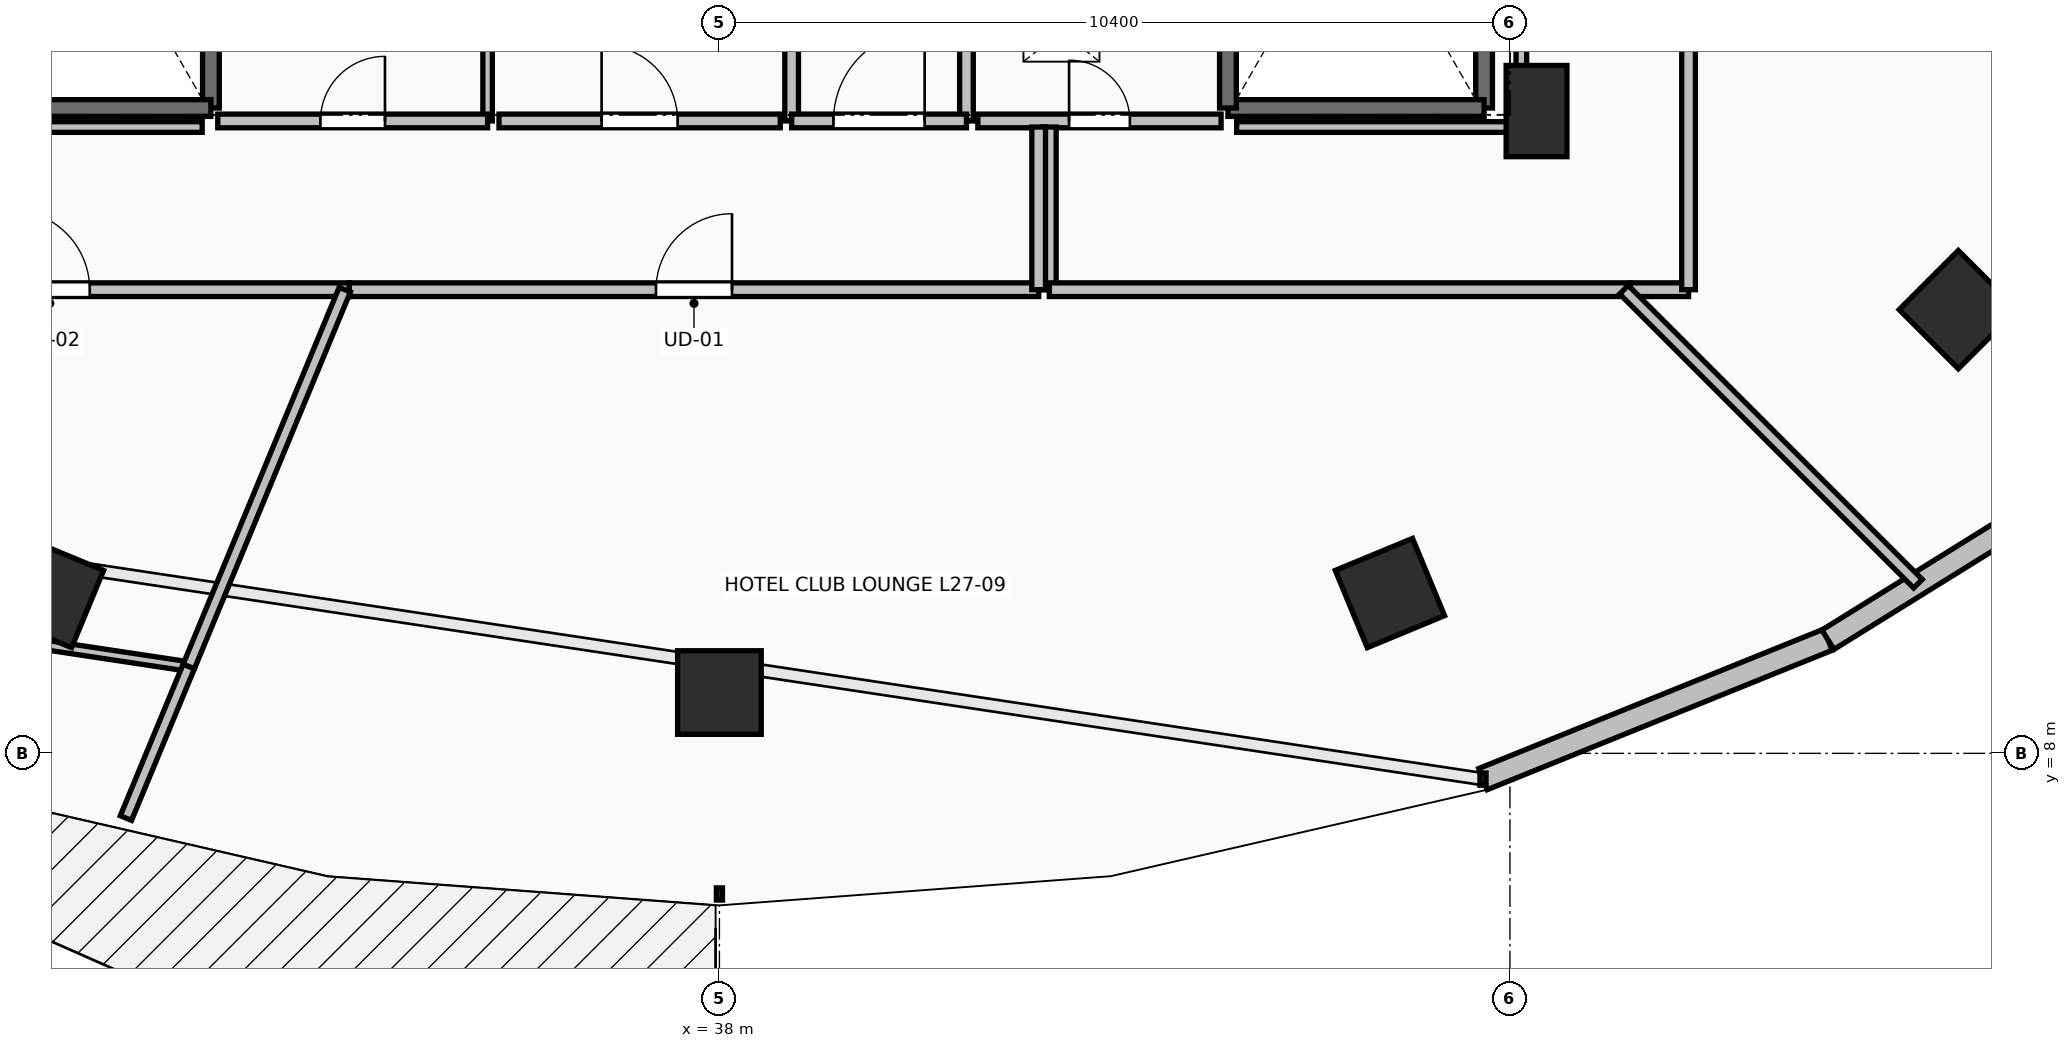
"""IFC4 building model, lengths in metres.
Left out: names, types, materials, properties, quantities, classifications, styles, units other than length and angle.
Written with IfcOpenShell. Run it as: python <this file> out.ifc"""

import sys

from ifc_helpers import new_model, si_unit, direction, frame, frame_2d, origin, origin_2d, place, context, subcontext, project, spatial, rectangle, extrude, element, fill, save


model = new_model("IFC4")
c1 = context("Model", 3, precision=1e-05, world=origin(), true_north=direction((0.0, 1.0)))
c2 = subcontext(c1, "Body", "Model", "MODEL_VIEW")
j1 = project(units=[si_unit("LENGTHUNIT", "METRE"), si_unit("PLANEANGLEUNIT", "RADIAN")], contexts=[c1])
p1 = place(None, origin())
s1 = spatial("IfcSite", under=j1, at=p1, CompositionType="ELEMENT")
p2 = place(p1, origin())
s2 = spatial("IfcBuilding", under=s1, at=p2, CompositionType="ELEMENT")
p3 = place(p2, frame((0.0, 0.0, 103.3)))
s3 = spatial("IfcBuildingStorey", under=s2, at=p3, CompositionType="ELEMENT", Elevation=103.3)
for number, where, z_axis, x_axis in (
    (1, (29.179, 10.109, 0.0), (0.0, 0.0, 1.0), (-0.383, -0.924, 0.0)),
    (2, (38.0, 8.8, 0.0), (0.0, 0.0, 1.0), (0.0, -1.0, 0.0)),
    (3, (46.821, 10.109, 0.0), (0.0, 0.0, 1.0), (0.383, -0.924, 0.0)),
    (4, (54.299, 13.838, 0.0), (0.0, 0.0, 1.0), (0.707, -0.707, 0.0)),
):
    element("IfcColumn", number, at=place(p3, frame(where, z_axis=z_axis, x_axis=x_axis)), inside=s3, PredefinedType="COLUMN", context=c2, shape_type="SweptSolid", body=[
        extrude(rectangle(XDim=1.1, YDim=1.1, at=origin_2d()), origin(), (0.0, 0.0, 1.0), 3.5),
    ])
p4 = place(p3, frame((48.75, 16.45, 0.0), z_axis=(0.0, 0.0, 1.0), x_axis=(1.0, 0.0, 0.0)))
e5 = element("IfcColumn", 5, at=p4, inside=s3, PredefinedType="PILASTER", context=c2, shape_type="SweptSolid", body=[
    extrude(rectangle(XDim=0.8, YDim=1.2, at=origin_2d()), origin(), (0.0, 0.0, 1.0), 3.5),
])
p5 = place(p3, frame((48.045, 7.661, 0.0), z_axis=(0.0, 0.0, 1.0), x_axis=(0.927122233109, 0.374759075775, 0.0)))
e6 = element("IfcWall", 6, at=p5, inside=s3, PredefinedType="STANDARD", context=c2, shape_type="SweptSolid", body=[
    extrude(rectangle(XDim=4.895, YDim=0.3, at=frame_2d((2.448, 0.0))), origin(), (0.0, 0.0, 1.0), 3.24),
])
p6 = place(p3, frame((52.584, 9.495, 0.0), z_axis=(0.0, 0.0, 1.0), x_axis=(0.849684479743, 0.527291461038, 0.0)))
e7 = element("IfcWall", 7, at=p6, inside=s3, PredefinedType="STANDARD", context=c2, shape_type="SweptSolid", body=[
    extrude(rectangle(XDim=4.681, YDim=0.3, at=frame_2d((2.341, 0.0))), origin(), (0.0, 0.0, 1.0), 3.24),
])
p7 = place(p3, frame((31.31, 23.91, 0.0), z_axis=(0.0, 0.0, 1.0), x_axis=(0.0, -1.0, 0.0)))
e8 = element("IfcWall", 8, at=p7, inside=s3, PredefinedType="SOLIDWALL", context=c2, shape_type="SweptSolid", body=[
    extrude(rectangle(XDim=7.42, YDim=0.22, at=frame_2d((3.71, 0.0))), origin(), (0.0, 0.0, 1.0), 3.24),
])
p8 = place(p3, frame((31.31, 16.49, 0.0), z_axis=(0.0, 0.0, 1.0), x_axis=(-1.0, 0.0, 0.0)))
e9 = element("IfcWall", 9, at=p8, inside=s3, PredefinedType="SOLIDWALL", context=c2, shape_type="SweptSolid", body=[
    extrude(rectangle(XDim=3.37, YDim=0.22, at=frame_2d((1.685, 0.0))), origin(), (0.0, 0.0, 1.0), 3.24),
])
p9 = place(p3, frame((48.06, 23.91, 0.0), z_axis=(0.0, 0.0, 1.0), x_axis=(0.0, -1.0, 0.0)))
e10 = element("IfcWall", 10, at=p9, inside=s3, PredefinedType="SOLIDWALL", context=c2, shape_type="SweptSolid", body=[
    extrude(rectangle(XDim=7.42, YDim=0.22, at=frame_2d((3.71, 0.0))), origin(), (0.0, 0.0, 1.0), 3.24),
])
p10 = place(p3, frame((48.06, 16.49, 0.0), z_axis=(0.0, 0.0, 1.0), x_axis=(-1.0, 0.0, 0.0)))
e11 = element("IfcWall", 11, at=p10, inside=s3, PredefinedType="SOLIDWALL", context=c2, shape_type="SweptSolid", body=[
    extrude(rectangle(XDim=3.37, YDim=0.22, at=frame_2d((1.685, 0.0))), origin(), (0.0, 0.0, 1.0), 3.24),
])
p11 = place(p3, frame((44.69, 16.49, 0.0), z_axis=(0.0, 0.0, 1.0), x_axis=(0.0, 1.0, 0.0)))
e12 = element("IfcWall", 12, at=p11, inside=s3, PredefinedType="SOLIDWALL", context=c2, shape_type="SweptSolid", body=[
    extrude(rectangle(XDim=7.42, YDim=0.22, at=frame_2d((3.71, 0.0))), origin(), (0.0, 0.0, 1.0), 3.24),
])
p12 = place(p3, frame((41.25, 16.32, 0.0), z_axis=(0.0, 0.0, 1.0), x_axis=(0.0, 1.0, 0.0)))
e13 = element("IfcWall", 13, at=p12, inside=s3, PredefinedType="PARTITIONING", context=c2, shape_type="SweptSolid", body=[
    extrude(rectangle(XDim=3.985, YDim=0.18, at=frame_2d((1.992, 0.0))), origin(), (0.0, 0.0, 1.0), 3.24),
])
p13 = place(p12, frame((1.593, 0.0, 0.0)))
e14 = element("IfcOpeningElement", 14, at=p13, cuts=e13, PredefinedType="OPENING", context=c2, shape_type="SweptSolid", body=[
    extrude(rectangle(XDim=0.8, YDim=2.05, at=frame_2d((0.4, 1.025))), frame((0.0, 0.105, 0.0), z_axis=(0.0, -1.0, 0.0), x_axis=(1.0, 0.0, 0.0)), (0.0, 0.0, 1.0), 0.21),
])
p14 = place(p3, frame((38.95, 21.755, 0.0), z_axis=(0.0, 0.0, 1.0), x_axis=(0.0, -1.0, 0.0)))
e15 = element("IfcWall", 15, at=p14, inside=s3, PredefinedType="PARTITIONING", context=c2, shape_type="SweptSolid", body=[
    extrude(rectangle(XDim=5.435, YDim=0.18, at=frame_2d((2.717, 0.0))), origin(), (0.0, 0.0, 1.0), 3.24),
])
p15 = place(p14, frame((2.218, 0.0, 0.0)))
e16 = element("IfcOpeningElement", 16, at=p15, cuts=e15, PredefinedType="OPENING", context=c2, shape_type="SweptSolid", body=[
    extrude(rectangle(XDim=1.0, YDim=2.15, at=frame_2d((0.5, 1.075))), frame((0.0, 0.105, 0.0), z_axis=(0.0, -1.0, 0.0), x_axis=(1.0, 0.0, 0.0)), (0.0, 0.0, 1.0), 0.21),
])
p16 = place(p3, frame((38.95, 16.32, 0.0), z_axis=(0.0, 0.0, 1.0), x_axis=(1.0, 0.0, 0.0)))
e17 = element("IfcWall", 17, at=p16, inside=s3, PredefinedType="PARTITIONING", context=c2, shape_type="SweptSolid", body=[
    extrude(rectangle(XDim=2.3, YDim=0.18, at=frame_2d((1.15, 0.0))), origin(), (0.0, 0.0, 1.0), 3.24),
])
p17 = place(p16, frame((0.55, 0.0, 0.0)))
e18 = element("IfcOpeningElement", 18, at=p17, cuts=e17, PredefinedType="OPENING", context=c2, shape_type="SweptSolid", body=[
    extrude(rectangle(XDim=1.2, YDim=2.15, at=frame_2d((0.6, 1.075))), frame((0.0, 0.105, 0.0), z_axis=(0.0, -1.0, 0.0), x_axis=(1.0, 0.0, 0.0)), (0.0, 0.0, 1.0), 0.21),
])
p18 = place(p3, frame((41.4, 16.32, 0.0), z_axis=(0.0, 0.0, 1.0), x_axis=(1.0, 0.0, 0.0)))
e19 = element("IfcWall", 19, at=p18, inside=s3, PredefinedType="PARTITIONING", context=c2, shape_type="SweptSolid", body=[
    extrude(rectangle(XDim=3.2, YDim=0.18, at=frame_2d((1.6, 0.0))), origin(), (0.0, 0.0, 1.0), 3.24),
])
p19 = place(p18, frame((1.2, 0.0, 0.0)))
e20 = element("IfcOpeningElement", 20, at=p19, cuts=e19, PredefinedType="OPENING", context=c2, shape_type="SweptSolid", body=[
    extrude(rectangle(XDim=0.8, YDim=2.05, at=frame_2d((0.4, 1.025))), frame((0.0, 0.105, 0.0), z_axis=(0.0, -1.0, 0.0), x_axis=(1.0, 0.0, 0.0)), (0.0, 0.0, 1.0), 0.21),
])
p20 = place(p3, frame((34.95, 16.32, 0.0), z_axis=(0.0, 0.0, 1.0), x_axis=(0.0, 1.0, 0.0)))
e21 = element("IfcWall", 21, at=p20, inside=s3, PredefinedType="PARTITIONING", context=c2, shape_type="SweptSolid", body=[
    extrude(rectangle(XDim=5.13, YDim=0.125, at=frame_2d((2.565, 0.0))), origin(), (0.0, 0.0, 1.0), 3.24),
])
p21 = place(p3, frame((31.4, 16.32, 0.0), z_axis=(0.0, 0.0, 1.0), x_axis=(1.0, 0.0, 0.0)))
e22 = element("IfcWall", 22, at=p21, inside=s3, PredefinedType="PARTITIONING", context=c2, shape_type="SweptSolid", body=[
    extrude(rectangle(XDim=3.55, YDim=0.18, at=frame_2d((1.775, 0.0))), origin(), (0.0, 0.0, 1.0), 3.24),
])
p22 = place(p21, frame((1.35, 0.0, 0.0)))
e23 = element("IfcOpeningElement", 23, at=p22, cuts=e22, PredefinedType="OPENING", context=c2, shape_type="SweptSolid", body=[
    extrude(rectangle(XDim=0.85, YDim=2.1, at=frame_2d((0.425, 1.05))), frame((0.0, 0.105, 0.0), z_axis=(0.0, -1.0, 0.0), x_axis=(1.0, 0.0, 0.0)), (0.0, 0.0, 1.0), 0.21),
])
p23 = place(p3, frame((35.1, 16.32, 0.0), z_axis=(0.0, 0.0, 1.0), x_axis=(1.0, 0.0, 0.0)))
e24 = element("IfcWall", 24, at=p23, inside=s3, PredefinedType="PARTITIONING", context=c2, shape_type="SweptSolid", body=[
    extrude(rectangle(XDim=3.7, YDim=0.18, at=frame_2d((1.85, 0.0))), origin(), (0.0, 0.0, 1.0), 3.24),
])
p24 = place(p23, frame((1.35, 0.0, 0.0)))
e25 = element("IfcOpeningElement", 25, at=p24, cuts=e24, PredefinedType="OPENING", context=c2, shape_type="SweptSolid", body=[
    extrude(rectangle(XDim=1.0, YDim=2.15, at=frame_2d((0.5, 1.075))), frame((0.0, 0.105, 0.0), z_axis=(0.0, -1.0, 0.0), x_axis=(1.0, 0.0, 0.0)), (0.0, 0.0, 1.0), 0.21),
])
p25 = place(p3, frame((25.25, 14.1, 0.0), z_axis=(0.0, 0.0, 1.0), x_axis=(1.0, 0.0, 0.0)))
e26 = element("IfcWall", 26, at=p25, inside=s3, PredefinedType="PARTITIONING", context=c2, shape_type="SweptSolid", body=[
    extrude(rectangle(XDim=7.881, YDim=0.18, at=frame_2d((3.94, 0.0))), origin(), (0.0, 0.0, 1.0), 2.432),
])
p26 = place(p25, frame((3.416, 0.0, 0.0)))
e27 = element("IfcOpeningElement", 27, at=p26, cuts=e26, PredefinedType="OPENING", context=c2, shape_type="SweptSolid", body=[
    extrude(rectangle(XDim=1.05, YDim=2.2, at=frame_2d((0.525, 1.1))), frame((0.0, 0.105, 0.0), z_axis=(0.0, -1.0, 0.0), x_axis=(1.0, 0.0, 0.0)), (0.0, 0.0, 1.0), 0.21),
])
p27 = place(p3, frame((42.34, 16.24, 0.0), z_axis=(0.0, 0.0, 1.0), x_axis=(0.0, -1.0, 0.0)))
e28 = element("IfcWall", 28, at=p27, inside=s3, PredefinedType="PARTITIONING", context=c2, shape_type="SweptSolid", body=[
    extrude(rectangle(XDim=2.14, YDim=0.18, at=frame_2d((1.07, 0.0))), origin(), (0.0, 0.0, 1.0), 3.24),
])
p28 = place(p3, frame((42.34, 14.1, 0.0), z_axis=(0.0, 0.0, 1.0), x_axis=(1.0, 0.0, 0.0)))
e29 = element("IfcWall", 29, at=p28, inside=s3, PredefinedType="PARTITIONING", context=c2, shape_type="SweptSolid", body=[
    extrude(rectangle(XDim=7.645, YDim=0.18, at=frame_2d((3.823, 0.0))), origin(), (0.0, 0.0, 1.0), 2.432),
])
p29 = place(p3, frame((33.131, 14.1, 0.0), z_axis=(0.0, 0.0, 1.0), x_axis=(1.0, 0.0, 0.0)))
e30 = element("IfcWall", 30, at=p29, inside=s3, PredefinedType="PARTITIONING", context=c2, shape_type="SweptSolid", body=[
    extrude(rectangle(XDim=9.069, YDim=0.18, at=frame_2d((4.534, 0.0))), origin(), (0.0, 0.0, 1.0), 2.886),
])
p30 = place(p29, frame((4.034, 0.0, 0.0)))
e31 = element("IfcOpeningElement", 31, at=p30, cuts=e30, PredefinedType="OPENING", context=c2, shape_type="SweptSolid", body=[
    extrude(rectangle(XDim=1.0, YDim=2.15, at=frame_2d((0.5, 1.075))), frame((0.0, 0.105, 0.0), z_axis=(0.0, -1.0, 0.0), x_axis=(1.0, 0.0, 0.0)), (0.0, 0.0, 1.0), 0.21),
])
p31 = place(p3, frame((42.2, 14.1, 0.0), z_axis=(0.0, 0.0, 1.0), x_axis=(0.0, 1.0, 0.0)))
e32 = element("IfcWall", 32, at=p31, inside=s3, PredefinedType="PARTITIONING", context=c2, shape_type="SweptSolid", body=[
    extrude(rectangle(XDim=2.14, YDim=0.18, at=frame_2d((1.07, 0.0))), origin(), (0.0, 0.0, 1.0), 3.24),
])
p32 = place(p3, frame((49.985, 14.1, 0.0), z_axis=(0.0, 0.0, 1.0), x_axis=(1.0, 0.0, 0.0)))
e33 = element("IfcWall", 33, at=p32, inside=s3, PredefinedType="PARTITIONING", context=c2, shape_type="SweptSolid", body=[
    extrude(rectangle(XDim=0.765, YDim=0.18, at=frame_2d((0.382, 0.0))), origin(), (0.0, 0.0, 1.0), 2.972),
])
p33 = place(p3, frame((50.75, 14.1, 0.0), z_axis=(0.0, 0.0, 1.0), x_axis=(0.0, 1.0, 0.0)))
e34 = element("IfcWall", 34, at=p33, inside=s3, PredefinedType="PARTITIONING", context=c2, shape_type="SweptSolid", body=[
    extrude(rectangle(XDim=16.981, YDim=0.18, at=frame_2d((8.49, 0.0))), origin(), (0.0, 0.0, 1.0), 2.432),
])
p34 = place(p33, frame((7.99, 0.0, 0.0)))
e35 = element("IfcOpeningElement", 35, at=p34, cuts=e34, PredefinedType="OPENING", context=c2, shape_type="SweptSolid", body=[
    extrude(rectangle(XDim=1.0, YDim=2.15, at=frame_2d((0.5, 1.075))), frame((0.0, 0.105, 0.0), z_axis=(0.0, -1.0, 0.0), x_axis=(1.0, 0.0, 0.0)), (0.0, 0.0, 1.0), 0.21),
])
p35 = place(p3, frame((28.938, 9.455, 0.0), z_axis=(0.0, 0.0, 1.0), x_axis=(0.988868142427, -0.148794478708, 0.0)))
e36 = element("IfcWall", 36, at=p35, inside=s3, PredefinedType="PARTITIONING", context=c2, shape_type="SweptSolid", body=[
    extrude(rectangle(XDim=2.104, YDim=0.125, at=frame_2d((1.052, 0.0))), origin(), (0.0, 0.0, 1.0), 3.24),
])
p36 = place(p3, frame((31.018, 9.142, 0.0), z_axis=(0.0, 0.0, 1.0), x_axis=(0.382572793579, 0.923925352836, 0.0)))
e37 = element("IfcWall", 37, at=p36, inside=s3, PredefinedType="PARTITIONING", context=c2, shape_type="SweptSolid", body=[
    extrude(rectangle(XDim=5.366, YDim=0.16, at=frame_2d((2.683, 0.0))), origin(), (0.0, 0.0, 1.0), 2.677),
])
p37 = place(p3, frame((30.192, 7.149, 0.0), z_axis=(0.0, 0.0, 1.0), x_axis=(0.382911401564, 0.923785071622, 0.0)))
e38 = element("IfcWall", 38, at=p37, inside=s3, PredefinedType="PARTITIONING", context=c2, shape_type="SweptSolid", body=[
    extrude(rectangle(XDim=2.158, YDim=0.16, at=frame_2d((1.079, 0.0))), origin(), (0.0, 0.0, 1.0), 3.24),
])
p38 = place(p3, frame((53.768, 10.232, 0.0), z_axis=(0.0, 0.0, 1.0), x_axis=(-0.707106781187, 0.707106781187, 0.0)))
e39 = element("IfcWall", 39, at=p38, inside=s3, PredefinedType="PARTITIONING", context=c2, shape_type="SweptSolid", body=[
    extrude(rectangle(XDim=5.47, YDim=0.16, at=frame_2d((2.735, 0.0))), origin(), (0.0, 0.0, 1.0), 2.677),
])
p39 = place(p3, frame((48.55, 23.754, 0.0), z_axis=(0.0, 0.0, 1.0), x_axis=(0.0, -1.0, 0.0)))
e40 = element("IfcWall", 40, at=p39, inside=s3, PredefinedType="PARTITIONING", context=c2, shape_type="SweptSolid", body=[
    extrude(rectangle(XDim=7.514, YDim=0.14, at=frame_2d((3.757, 0.0))), origin(), (0.0, 0.0, 1.0), 2.432),
])
for number, where, z_axis, x_axis in (
    (41, (48.55, 16.24, 0.0), (0.0, 0.0, 1.0), (-1.0, 0.0, 0.0)),
    (42, (31.195, 16.24, 0.0), (0.0, 0.0, 1.0), (-1.0, 0.0, 0.0)),
):
    element("IfcWall", number, at=place(p3, frame(where, z_axis=z_axis, x_axis=x_axis)), inside=s3, PredefinedType="PARTITIONING", context=c2, shape_type="SweptSolid", body=[
        extrude(rectangle(XDim=3.745, YDim=0.14, at=frame_2d((1.873, 0.0))), origin(), (0.0, 0.0, 1.0), 2.432),
    ])
p40 = place(p17, origin())
e43 = element("IfcDoor", 43, at=p40, inside=s3, OperationType="SINGLE_SWING_RIGHT", PredefinedType="DOOR", context=c2, shape_type="SweptSolid", body=[
    extrude(rectangle(XDim=1.2, YDim=2.15, at=frame_2d((0.6, 1.075))), frame((0.0, 0.025, 0.0), z_axis=(0.0, -1.0, 0.0), x_axis=(1.0, 0.0, 0.0)), (0.0, 0.0, 1.0), 0.05),
])
fill(e18, e43)
p41 = place(p19, origin())
e44 = element("IfcDoor", 44, at=p41, inside=s3, OperationType="SINGLE_SWING_LEFT", PredefinedType="DOOR", context=c2, shape_type="SweptSolid", body=[
    extrude(rectangle(XDim=0.8, YDim=2.05, at=frame_2d((0.4, 1.025))), frame((0.0, 0.025, 0.0), z_axis=(0.0, -1.0, 0.0), x_axis=(1.0, 0.0, 0.0)), (0.0, 0.0, 1.0), 0.05),
])
fill(e20, e44)
p42 = place(p22, origin())
e45 = element("IfcDoor", 45, at=p42, inside=s3, OperationType="SINGLE_SWING_RIGHT", PredefinedType="DOOR", context=c2, shape_type="SweptSolid", body=[
    extrude(rectangle(XDim=0.85, YDim=2.1, at=frame_2d((0.425, 1.05))), frame((0.0, 0.025, 0.0), z_axis=(0.0, -1.0, 0.0), x_axis=(1.0, 0.0, 0.0)), (0.0, 0.0, 1.0), 0.05),
])
fill(e23, e45)
p43 = place(p24, origin())
e46 = element("IfcDoor", 46, at=p43, inside=s3, OperationType="SINGLE_SWING_LEFT", PredefinedType="DOOR", context=c2, shape_type="SweptSolid", body=[
    extrude(rectangle(XDim=1.0, YDim=2.15, at=frame_2d((0.5, 1.075))), frame((0.0, 0.025, 0.0), z_axis=(0.0, -1.0, 0.0), x_axis=(1.0, 0.0, 0.0)), (0.0, 0.0, 1.0), 0.05),
])
fill(e25, e46)
p44 = place(p26, origin())
e47 = element("IfcDoor", 47, at=p44, inside=s3, OperationType="SINGLE_SWING_LEFT", PredefinedType="DOOR", context=c2, shape_type="SweptSolid", body=[
    extrude(rectangle(XDim=1.05, YDim=2.2, at=frame_2d((0.525, 1.1))), frame((0.0, 0.025, 0.0), z_axis=(0.0, -1.0, 0.0), x_axis=(1.0, 0.0, 0.0)), (0.0, 0.0, 1.0), 0.05),
])
fill(e27, e47)
p45 = place(p30, origin())
e48 = element("IfcDoor", 48, at=p45, inside=s3, OperationType="SINGLE_SWING_RIGHT", PredefinedType="DOOR", context=c2, shape_type="SweptSolid", body=[
    extrude(rectangle(XDim=1.0, YDim=2.15, at=frame_2d((0.5, 1.075))), frame((0.0, 0.025, 0.0), z_axis=(0.0, -1.0, 0.0), x_axis=(1.0, 0.0, 0.0)), (0.0, 0.0, 1.0), 0.05),
])
fill(e31, e48)
save(model, sys.argv[1])
